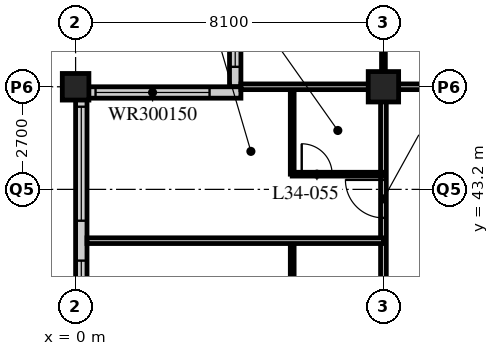
"""IFC4 building model, lengths in metres.
Left out: names, types, materials, properties, quantities, classifications, styles, units other than length and angle.
Written with IfcOpenShell. Run it as: python <this file> out.ifc"""

import sys

from ifc_helpers import new_model, si_unit, direction, frame, frame_2d, origin, origin_2d, place, context, subcontext, project, spatial, rectangle, hollow_rectangle, extrude, element, fill, save


model = new_model("IFC4")
c1 = context("Model", 3, precision=1e-05, world=origin(), true_north=direction((0.0, 1.0)))
c2 = subcontext(c1, "Body", "Model", "MODEL_VIEW")
j1 = project(units=[si_unit("LENGTHUNIT", "METRE"), si_unit("PLANEANGLEUNIT", "RADIAN")], contexts=[c1])
p1 = place(None, origin())
s1 = spatial("IfcSite", under=j1, at=p1, CompositionType="ELEMENT")
p2 = place(p1, origin())
s2 = spatial("IfcBuilding", under=s1, at=p2, CompositionType="ELEMENT")
p3 = place(p2, frame((0.0, 0.0, 134.0)))
s3 = spatial("IfcBuildingStorey", under=s2, at=p3, CompositionType="ELEMENT", Elevation=134.0)
p4 = place(p3, frame((0.0, 45.9, 0.0), z_axis=(0.0, 0.0, 1.0), x_axis=(1.0, 0.0, 0.0)))
e1 = element("IfcColumn", 1, at=p4, inside=s3, PredefinedType="COLUMN", context=c2, shape_type="SweptSolid", body=[
    extrude(hollow_rectangle(XDim=0.7, YDim=0.7, WallThickness=0.07, at=origin_2d()), origin(), (0.0, 0.0, 1.0), 3.4),
])
p5 = place(p3, frame((8.1, 45.9, 0.0), z_axis=(0.0, 0.0, 1.0), x_axis=(1.0, 0.0, 0.0)))
e2 = element("IfcColumn", 2, at=p5, inside=s3, PredefinedType="COLUMN", context=c2, shape_type="SweptSolid", body=[
    extrude(hollow_rectangle(XDim=0.8, YDim=0.8, WallThickness=0.08, at=origin_2d()), origin(), (0.0, 0.0, 1.0), 3.4),
])
p6 = place(p3, frame((4.2, 49.65, 0.0), z_axis=(0.0, 0.0, 1.0), x_axis=(0.0, -1.0, 0.0)))
e3 = element("IfcWall", 3, at=p6, inside=s3, PredefinedType="SOLIDWALL", context=c2, shape_type="SweptSolid", body=[
    extrude(rectangle(XDim=3.75, YDim=0.3, at=frame_2d((1.875, 0.0))), origin(), (0.0, 0.0, 1.0), 3.19),
])
p7 = place(p6, frame((0.225, 0.0, 0.9)))
e4 = element("IfcOpeningElement", 4, at=p7, cuts=e3, PredefinedType="OPENING", context=c2, shape_type="SweptSolid", body=[
    extrude(rectangle(XDim=3.0, YDim=1.5, at=frame_2d((1.5, 0.75))), frame((0.0, 0.16, 0.0), z_axis=(0.0, -1.0, 0.0), x_axis=(1.0, 0.0, 0.0)), (0.0, 0.0, 1.0), 0.32),
])
p8 = place(p3, frame((4.35, 45.75, 0.0), z_axis=(0.0, 0.0, 1.0), x_axis=(-1.0, 0.0, 0.0)))
e5 = element("IfcWall", 5, at=p8, inside=s3, PredefinedType="SOLIDWALL", context=c2, shape_type="SweptSolid", body=[
    extrude(rectangle(XDim=4.35, YDim=0.3, at=frame_2d((2.175, 0.0))), origin(), (0.0, 0.0, 1.0), 3.19),
])
p9 = place(p8, frame((0.825, 0.0, 0.9)))
e6 = element("IfcOpeningElement", 6, at=p9, cuts=e5, PredefinedType="OPENING", context=c2, shape_type="SweptSolid", body=[
    extrude(rectangle(XDim=3.0, YDim=1.5, at=frame_2d((1.5, 0.75))), frame((0.0, 0.16, 0.0), z_axis=(0.0, -1.0, 0.0), x_axis=(1.0, 0.0, 0.0)), (0.0, 0.0, 1.0), 0.32),
])
p10 = place(p3, frame((0.15, 45.6, 0.0), z_axis=(0.0, 0.0, 1.0), x_axis=(0.0, -1.0, 0.0)))
e7 = element("IfcWall", 7, at=p10, inside=s3, PredefinedType="SOLIDWALL", context=c2, shape_type="SweptSolid", body=[
    extrude(rectangle(XDim=32.1, YDim=0.3, at=frame_2d((16.05, 0.0))), origin(), (0.0, 0.0, 1.0), 3.19),
])
p11 = place(p10, frame((0.225, 0.0, 0.9)))
e8 = element("IfcOpeningElement", 8, at=p11, cuts=e7, PredefinedType="OPENING", context=c2, shape_type="SweptSolid", body=[
    extrude(rectangle(XDim=3.0, YDim=2.0, at=frame_2d((1.5, 1.0))), frame((0.0, 0.16, 0.0), z_axis=(0.0, -1.0, 0.0), x_axis=(1.0, 0.0, 0.0)), (0.0, 0.0, 1.0), 0.32),
])
p12 = place(p10, frame((4.275, 0.0, 0.9)))
e9 = element("IfcOpeningElement", 9, at=p12, cuts=e7, PredefinedType="OPENING", context=c2, shape_type="SweptSolid", body=[
    extrude(rectangle(XDim=3.0, YDim=2.0, at=frame_2d((1.5, 1.0))), frame((0.0, 0.16, 0.0), z_axis=(0.0, -1.0, 0.0), x_axis=(1.0, 0.0, 0.0)), (0.0, 0.0, 1.0), 0.32),
])
p13 = place(p10, frame((8.325, 0.0, 0.9)))
e10 = element("IfcOpeningElement", 10, at=p13, cuts=e7, PredefinedType="OPENING", context=c2, shape_type="SweptSolid", body=[
    extrude(rectangle(XDim=3.0, YDim=2.0, at=frame_2d((1.5, 1.0))), frame((0.0, 0.16, 0.0), z_axis=(0.0, -1.0, 0.0), x_axis=(1.0, 0.0, 0.0)), (0.0, 0.0, 1.0), 0.32),
])
p14 = place(p10, frame((12.375, 0.0, 0.9)))
e11 = element("IfcOpeningElement", 11, at=p14, cuts=e7, PredefinedType="OPENING", context=c2, shape_type="SweptSolid", body=[
    extrude(rectangle(XDim=3.0, YDim=2.0, at=frame_2d((1.5, 1.0))), frame((0.0, 0.16, 0.0), z_axis=(0.0, -1.0, 0.0), x_axis=(1.0, 0.0, 0.0)), (0.0, 0.0, 1.0), 0.32),
])
p15 = place(p10, frame((16.425, 0.0, 0.9)))
e12 = element("IfcOpeningElement", 12, at=p15, cuts=e7, PredefinedType="OPENING", context=c2, shape_type="SweptSolid", body=[
    extrude(rectangle(XDim=3.0, YDim=2.0, at=frame_2d((1.5, 1.0))), frame((0.0, 0.16, 0.0), z_axis=(0.0, -1.0, 0.0), x_axis=(1.0, 0.0, 0.0)), (0.0, 0.0, 1.0), 0.32),
])
p16 = place(p10, frame((20.475, 0.0, 0.9)))
e13 = element("IfcOpeningElement", 13, at=p16, cuts=e7, PredefinedType="OPENING", context=c2, shape_type="SweptSolid", body=[
    extrude(rectangle(XDim=3.0, YDim=2.0, at=frame_2d((1.5, 1.0))), frame((0.0, 0.16, 0.0), z_axis=(0.0, -1.0, 0.0), x_axis=(1.0, 0.0, 0.0)), (0.0, 0.0, 1.0), 0.32),
])
p17 = place(p10, frame((24.525, 0.0, 0.9)))
e14 = element("IfcOpeningElement", 14, at=p17, cuts=e7, PredefinedType="OPENING", context=c2, shape_type="SweptSolid", body=[
    extrude(rectangle(XDim=3.0, YDim=2.0, at=frame_2d((1.5, 1.0))), frame((0.0, 0.16, 0.0), z_axis=(0.0, -1.0, 0.0), x_axis=(1.0, 0.0, 0.0)), (0.0, 0.0, 1.0), 0.32),
])
p18 = place(p10, frame((28.575, 0.0, 0.9)))
e15 = element("IfcOpeningElement", 15, at=p18, cuts=e7, PredefinedType="OPENING", context=c2, shape_type="SweptSolid", body=[
    extrude(rectangle(XDim=3.0, YDim=2.0, at=frame_2d((1.5, 1.0))), frame((0.0, 0.16, 0.0), z_axis=(0.0, -1.0, 0.0), x_axis=(1.0, 0.0, 0.0)), (0.0, 0.0, 1.0), 0.32),
])
p19 = place(p3, frame((8.1, 45.9, 0.0), z_axis=(0.0, 0.0, 1.0), x_axis=(1.0, 0.0, 0.0)))
e16 = element("IfcWall", 16, at=p19, inside=s3, PredefinedType="PARTITIONING", context=c2, shape_type="SweptSolid", body=[
    extrude(rectangle(XDim=36.45, YDim=0.15, at=frame_2d((18.225, 0.0))), origin(), (0.0, 0.0, 1.0), 2.578),
])
p20 = place(p19, frame((9.625, 0.0, 0.0)))
e17 = element("IfcOpeningElement", 17, at=p20, cuts=e16, PredefinedType="OPENING", context=c2, shape_type="SweptSolid", body=[
    extrude(rectangle(XDim=1.0, YDim=2.1, at=frame_2d((0.5, 1.05))), frame((0.0, 0.085, 0.0), z_axis=(0.0, -1.0, 0.0), x_axis=(1.0, 0.0, 0.0)), (0.0, 0.0, 1.0), 0.17),
])
p21 = place(p19, frame((21.775, 0.0, 0.0)))
e18 = element("IfcOpeningElement", 18, at=p21, cuts=e16, PredefinedType="OPENING", context=c2, shape_type="SweptSolid", body=[
    extrude(rectangle(XDim=1.0, YDim=2.1, at=frame_2d((0.5, 1.05))), frame((0.0, 0.085, 0.0), z_axis=(0.0, -1.0, 0.0), x_axis=(1.0, 0.0, 0.0)), (0.0, 0.0, 1.0), 0.17),
])
p22 = place(p19, frame((28.95, 0.0, 0.0)))
e19 = element("IfcOpeningElement", 19, at=p22, cuts=e16, PredefinedType="OPENING", context=c2, shape_type="SweptSolid", body=[
    extrude(rectangle(XDim=1.0, YDim=2.1, at=frame_2d((0.5, 1.05))), frame((0.0, 0.085, 0.0), z_axis=(0.0, -1.0, 0.0), x_axis=(1.0, 0.0, 0.0)), (0.0, 0.0, 1.0), 0.17),
])
p23 = place(p19, frame((33.925, 0.0, 0.0)))
e20 = element("IfcOpeningElement", 20, at=p23, cuts=e16, PredefinedType="OPENING", context=c2, shape_type="SweptSolid", body=[
    extrude(rectangle(XDim=1.0, YDim=2.1, at=frame_2d((0.5, 1.05))), frame((0.0, 0.085, 0.0), z_axis=(0.0, -1.0, 0.0), x_axis=(1.0, 0.0, 0.0)), (0.0, 0.0, 1.0), 0.17),
])
p24 = place(p19, frame((2.625, 0.0, 0.0)))
e21 = element("IfcOpeningElement", 21, at=p24, cuts=e16, PredefinedType="OPENING", context=c2, shape_type="SweptSolid", body=[
    extrude(rectangle(XDim=1.0, YDim=2.1, at=frame_2d((0.5, 1.05))), frame((0.0, 0.085, 0.0), z_axis=(0.0, -1.0, 0.0), x_axis=(1.0, 0.0, 0.0)), (0.0, 0.0, 1.0), 0.17),
])
p25 = place(p3, frame((8.1, 17.55, 0.0), z_axis=(0.0, 0.0, 1.0), x_axis=(0.0, 1.0, 0.0)))
e22 = element("IfcWall", 22, at=p25, inside=s3, PredefinedType="PARTITIONING", context=c2, shape_type="SweptSolid", body=[
    extrude(rectangle(XDim=28.35, YDim=0.15, at=frame_2d((14.175, 0.0))), origin(), (0.0, 0.0, 1.0), 2.578),
])
p26 = place(p25, frame((1.9, 0.0, 0.0)))
e23 = element("IfcOpeningElement", 23, at=p26, cuts=e22, PredefinedType="OPENING", context=c2, shape_type="SweptSolid", body=[
    extrude(rectangle(XDim=1.0, YDim=2.1, at=frame_2d((0.5, 1.05))), frame((0.0, 0.085, 0.0), z_axis=(0.0, -1.0, 0.0), x_axis=(1.0, 0.0, 0.0)), (0.0, 0.0, 1.0), 0.17),
])
p27 = place(p25, frame((10.0, 0.0, 0.0)))
e24 = element("IfcOpeningElement", 24, at=p27, cuts=e22, PredefinedType="OPENING", context=c2, shape_type="SweptSolid", body=[
    extrude(rectangle(XDim=1.0, YDim=2.1, at=frame_2d((0.5, 1.05))), frame((0.0, 0.085, 0.0), z_axis=(0.0, -1.0, 0.0), x_axis=(1.0, 0.0, 0.0)), (0.0, 0.0, 1.0), 0.17),
])
p28 = place(p25, frame((18.1, 0.0, 0.0)))
e25 = element("IfcOpeningElement", 25, at=p28, cuts=e22, PredefinedType="OPENING", context=c2, shape_type="SweptSolid", body=[
    extrude(rectangle(XDim=1.0, YDim=2.1, at=frame_2d((0.5, 1.05))), frame((0.0, 0.085, 0.0), z_axis=(0.0, -1.0, 0.0), x_axis=(1.0, 0.0, 0.0)), (0.0, 0.0, 1.0), 0.17),
])
p29 = place(p25, frame((24.9, 0.0, 0.0)))
e26 = element("IfcOpeningElement", 26, at=p29, cuts=e22, PredefinedType="OPENING", context=c2, shape_type="SweptSolid", body=[
    extrude(rectangle(XDim=1.0, YDim=2.1, at=frame_2d((0.5, 1.05))), frame((0.0, 0.085, 0.0), z_axis=(0.0, -1.0, 0.0), x_axis=(1.0, 0.0, 0.0)), (0.0, 0.0, 1.0), 0.17),
])
p30 = place(p3, frame((5.7, 39.25, 0.0), z_axis=(0.0, 0.0, 1.0), x_axis=(0.0, 1.0, 0.0)))
e27 = element("IfcWall", 27, at=p30, inside=s3, PredefinedType="PARTITIONING", context=c2, shape_type="SweptSolid", body=[
    extrude(rectangle(XDim=2.6, YDim=0.1, at=frame_2d((1.3, 0.0))), origin(), (0.0, 0.0, 1.0), 3.19),
])
p31 = place(p3, frame((8.1, 41.85, 0.0), z_axis=(0.0, 0.0, 1.0), x_axis=(-1.0, 0.0, 0.0)))
e28 = element("IfcWall", 28, at=p31, inside=s3, PredefinedType="PARTITIONING", context=c2, shape_type="SweptSolid", body=[
    extrude(rectangle(XDim=7.8, YDim=0.15, at=frame_2d((3.9, 0.0))), origin(), (0.0, 0.0, 1.0), 3.19),
])
p32 = place(p3, frame((5.7, 43.6, 0.0), z_axis=(0.0, 0.0, 1.0), x_axis=(0.0, 1.0, 0.0)))
e29 = element("IfcWall", 29, at=p32, inside=s3, PredefinedType="PARTITIONING", context=c2, shape_type="SweptSolid", body=[
    extrude(rectangle(XDim=2.3, YDim=0.1, at=frame_2d((1.15, 0.0))), origin(), (0.0, 0.0, 1.0), 3.19),
])
p33 = place(p3, frame((8.1, 43.6, 0.0), z_axis=(0.0, 0.0, 1.0), x_axis=(-1.0, 0.0, 0.0)))
e30 = element("IfcWall", 30, at=p33, inside=s3, PredefinedType="PARTITIONING", context=c2, shape_type="SweptSolid", body=[
    extrude(rectangle(XDim=2.4, YDim=0.1, at=frame_2d((1.2, 0.0))), origin(), (0.0, 0.0, 1.0), 3.19),
])
p34 = place(p33, frame((1.35, 0.0, 0.0)))
e31 = element("IfcOpeningElement", 31, at=p34, cuts=e30, PredefinedType="OPENING", context=c2, shape_type="SweptSolid", body=[
    extrude(rectangle(XDim=0.8, YDim=2.1, at=frame_2d((0.4, 1.05))), frame((0.0, 0.06, 0.0), z_axis=(0.0, -1.0, 0.0), x_axis=(1.0, 0.0, 0.0)), (0.0, 0.0, 1.0), 0.12),
])
p35 = place(p3, frame((8.1, 45.9, 0.0), z_axis=(0.0, 0.0, 1.0), x_axis=(0.0, 1.0, 0.0)))
e32 = element("IfcWall", 32, at=p35, inside=s3, PredefinedType="PARTITIONING", context=c2, shape_type="SweptSolid", body=[
    extrude(rectangle(XDim=2.4, YDim=0.1, at=frame_2d((1.2, 0.0))), origin(), (0.0, 0.0, 1.0), 2.578),
])
p36 = place(p3, frame((4.35, 45.9, 0.0), z_axis=(0.0, 0.0, 1.0), x_axis=(1.0, 0.0, 0.0)))
e33 = element("IfcWall", 33, at=p36, inside=s3, PredefinedType="PARTITIONING", context=c2, shape_type="SweptSolid", body=[
    extrude(rectangle(XDim=3.75, YDim=0.15, at=frame_2d((1.875, 0.0))), origin(), (0.0, 0.0, 1.0), 2.578),
])
p37 = place(p7, origin())
e34 = element("IfcWindow", 34, at=p37, inside=s3, PartitioningType="SINGLE_PANEL", PredefinedType="WINDOW", context=c2, shape_type="SweptSolid", body=[
    extrude(rectangle(XDim=3.0, YDim=1.5, at=frame_2d((1.5, 0.75))), frame((0.0, 0.03, 0.0), z_axis=(0.0, -1.0, 0.0), x_axis=(1.0, 0.0, 0.0)), (0.0, 0.0, 1.0), 0.06),
])
fill(e4, e34)
p38 = place(p9, origin())
e35 = element("IfcWindow", 35, at=p38, inside=s3, PartitioningType="SINGLE_PANEL", PredefinedType="WINDOW", context=c2, shape_type="SweptSolid", body=[
    extrude(rectangle(XDim=3.0, YDim=1.5, at=frame_2d((1.5, 0.75))), frame((0.0, 0.03, 0.0), z_axis=(0.0, -1.0, 0.0), x_axis=(1.0, 0.0, 0.0)), (0.0, 0.0, 1.0), 0.06),
])
fill(e6, e35)
p39 = place(p11, origin())
e36 = element("IfcWindow", 36, at=p39, inside=s3, PartitioningType="SINGLE_PANEL", PredefinedType="WINDOW", context=c2, shape_type="SweptSolid", body=[
    extrude(rectangle(XDim=3.0, YDim=2.0, at=frame_2d((1.5, 1.0))), frame((0.0, 0.03, 0.0), z_axis=(0.0, -1.0, 0.0), x_axis=(1.0, 0.0, 0.0)), (0.0, 0.0, 1.0), 0.06),
])
fill(e8, e36)
p40 = place(p12, origin())
e37 = element("IfcWindow", 37, at=p40, inside=s3, PartitioningType="SINGLE_PANEL", PredefinedType="WINDOW", context=c2, shape_type="SweptSolid", body=[
    extrude(rectangle(XDim=3.0, YDim=2.0, at=frame_2d((1.5, 1.0))), frame((0.0, 0.03, 0.0), z_axis=(0.0, -1.0, 0.0), x_axis=(1.0, 0.0, 0.0)), (0.0, 0.0, 1.0), 0.06),
])
fill(e9, e37)
p41 = place(p34, origin())
e38 = element("IfcDoor", 38, at=p41, inside=s3, OperationType="SINGLE_SWING_LEFT", PredefinedType="DOOR", context=c2, shape_type="SweptSolid", body=[
    extrude(rectangle(XDim=0.8, YDim=2.1, at=frame_2d((0.4, 1.05))), frame((0.0, 0.025, 0.0), z_axis=(0.0, -1.0, 0.0), x_axis=(1.0, 0.0, 0.0)), (0.0, 0.0, 1.0), 0.05),
])
fill(e31, e38)
p42 = place(p29, origin())
e39 = element("IfcDoor", 39, at=p42, inside=s3, OperationType="SINGLE_SWING_RIGHT", PredefinedType="DOOR", context=c2, shape_type="SweptSolid", body=[
    extrude(rectangle(XDim=1.0, YDim=2.1, at=frame_2d((0.5, 1.05))), frame((0.0, 0.025, 0.0), z_axis=(0.0, -1.0, 0.0), x_axis=(1.0, 0.0, 0.0)), (0.0, 0.0, 1.0), 0.05),
])
fill(e26, e39)
save(model, sys.argv[1])
